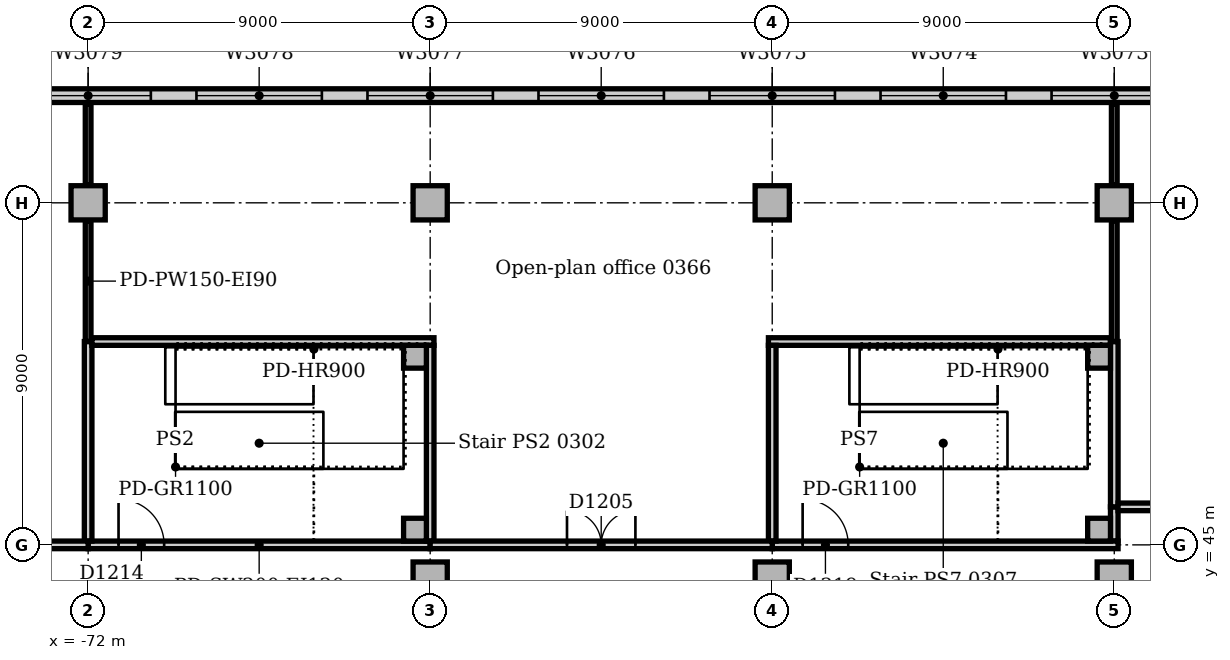
"""IFC4 building model, lengths in metres.
Left out: names, types, materials, properties, quantities, classifications, styles, units other than length and angle.
Written with IfcOpenShell. Run it as: python <this file> out.ifc"""

import sys

from ifc_helpers import new_model, si_unit, direction, frame, frame_2d, origin, origin_2d, place, context, subcontext, project, spatial, rectangle, extrude, element, fill, save


model = new_model("IFC4")
c1 = context("Model", 3, precision=1e-05, world=origin(), true_north=direction((0.0, 1.0)))
c2 = subcontext(c1, "Body", "Model", "MODEL_VIEW")
j1 = project(units=[si_unit("LENGTHUNIT", "METRE"), si_unit("PLANEANGLEUNIT", "RADIAN")], contexts=[c1])
p1 = place(None, origin())
s1 = spatial("IfcSite", under=j1, at=p1, CompositionType="ELEMENT")
p2 = place(p1, origin())
s2 = spatial("IfcBuilding", under=s1, at=p2, CompositionType="ELEMENT")
p3 = place(p2, frame((0.0, 0.0, 16.0)))
s3 = spatial("IfcBuildingStorey", under=s2, at=p3, CompositionType="ELEMENT", Elevation=16.0)
p4 = place(p3, frame((-68.398, 43.547, 0.0), z_axis=(0.0, 0.0, 1.0), x_axis=(1.0, 0.0, 0.0)))
e1 = element("IfcColumn", 1, at=p4, inside=s3, PredefinedType="COLUMN", context=c2, shape_type="SweptSolid", body=[
    extrude(rectangle(XDim=1.1, YDim=1.1, at=origin_2d()), origin(), (0.0, 0.0, 1.0), 4.7),
])
for number, where, z_axis, x_axis in (
    (2, (-63.0, 44.1, 0.0), (0.0, 0.0, 1.0), (1.0, 0.0, 0.0)),
    (3, (-54.0, 44.1, 0.0), (0.0, 0.0, 1.0), (1.0, 0.0, 0.0)),
    (4, (-45.0, 44.1, 0.0), (0.0, 0.0, 1.0), (1.0, 0.0, 0.0)),
    (5, (-72.0, 54.0, 0.0), (0.0, 0.0, 1.0), (1.0, 0.0, 0.0)),
    (6, (-63.0, 54.0, 0.0), (0.0, 0.0, 1.0), (1.0, 0.0, 0.0)),
    (7, (-54.0, 54.0, 0.0), (0.0, 0.0, 1.0), (1.0, 0.0, 0.0)),
    (8, (-45.0, 54.0, 0.0), (0.0, 0.0, 1.0), (1.0, 0.0, 0.0)),
):
    element("IfcColumn", number, at=place(p3, frame(where, z_axis=z_axis, x_axis=x_axis)), inside=s3, PredefinedType="COLUMN", context=c2, shape_type="SweptSolid", body=[
        extrude(rectangle(XDim=0.9, YDim=0.9, at=origin_2d()), origin(), (0.0, 0.0, 1.0), 4.7),
    ])
p5 = place(p3, frame((63.0, 56.82, 0.0), z_axis=(0.0, 0.0, 1.0), x_axis=(-1.0, 0.0, 0.0)))
e9 = element("IfcWall", 9, at=p5, inside=s3, PredefinedType="STANDARD", context=c2, shape_type="SweptSolid", body=[
    extrude(rectangle(XDim=144.0, YDim=0.36, at=frame_2d((72.0, 0.0))), origin(), (0.0, 0.0, 1.0), 4.7),
])
p6 = place(p5, frame((2.85, 0.0, 0.9)))
e10 = element("IfcOpeningElement", 10, at=p6, cuts=e9, PredefinedType="OPENING", context=c2, shape_type="SweptSolid", body=[
    extrude(rectangle(XDim=3.3, YDim=2.4, at=frame_2d((1.65, 1.2))), frame((0.0, 0.19, 0.0), z_axis=(0.0, -1.0, 0.0), x_axis=(1.0, 0.0, 0.0)), (0.0, 0.0, 1.0), 0.38),
])
p7 = place(p5, frame((7.35, 0.0, 0.9)))
e11 = element("IfcOpeningElement", 11, at=p7, cuts=e9, PredefinedType="OPENING", context=c2, shape_type="SweptSolid", body=[
    extrude(rectangle(XDim=3.3, YDim=2.4, at=frame_2d((1.65, 1.2))), frame((0.0, 0.19, 0.0), z_axis=(0.0, -1.0, 0.0), x_axis=(1.0, 0.0, 0.0)), (0.0, 0.0, 1.0), 0.38),
])
p8 = place(p5, frame((11.85, 0.0, 0.9)))
e12 = element("IfcOpeningElement", 12, at=p8, cuts=e9, PredefinedType="OPENING", context=c2, shape_type="SweptSolid", body=[
    extrude(rectangle(XDim=3.3, YDim=2.4, at=frame_2d((1.65, 1.2))), frame((0.0, 0.19, 0.0), z_axis=(0.0, -1.0, 0.0), x_axis=(1.0, 0.0, 0.0)), (0.0, 0.0, 1.0), 0.38),
])
p9 = place(p5, frame((16.35, 0.0, 0.9)))
e13 = element("IfcOpeningElement", 13, at=p9, cuts=e9, PredefinedType="OPENING", context=c2, shape_type="SweptSolid", body=[
    extrude(rectangle(XDim=3.3, YDim=2.4, at=frame_2d((1.65, 1.2))), frame((0.0, 0.19, 0.0), z_axis=(0.0, -1.0, 0.0), x_axis=(1.0, 0.0, 0.0)), (0.0, 0.0, 1.0), 0.38),
])
p10 = place(p5, frame((20.85, 0.0, 0.9)))
e14 = element("IfcOpeningElement", 14, at=p10, cuts=e9, PredefinedType="OPENING", context=c2, shape_type="SweptSolid", body=[
    extrude(rectangle(XDim=3.3, YDim=2.4, at=frame_2d((1.65, 1.2))), frame((0.0, 0.19, 0.0), z_axis=(0.0, -1.0, 0.0), x_axis=(1.0, 0.0, 0.0)), (0.0, 0.0, 1.0), 0.38),
])
p11 = place(p5, frame((25.35, 0.0, 0.9)))
e15 = element("IfcOpeningElement", 15, at=p11, cuts=e9, PredefinedType="OPENING", context=c2, shape_type="SweptSolid", body=[
    extrude(rectangle(XDim=3.3, YDim=2.4, at=frame_2d((1.65, 1.2))), frame((0.0, 0.19, 0.0), z_axis=(0.0, -1.0, 0.0), x_axis=(1.0, 0.0, 0.0)), (0.0, 0.0, 1.0), 0.38),
])
p12 = place(p5, frame((29.85, 0.0, 0.9)))
e16 = element("IfcOpeningElement", 16, at=p12, cuts=e9, PredefinedType="OPENING", context=c2, shape_type="SweptSolid", body=[
    extrude(rectangle(XDim=3.3, YDim=2.4, at=frame_2d((1.65, 1.2))), frame((0.0, 0.19, 0.0), z_axis=(0.0, -1.0, 0.0), x_axis=(1.0, 0.0, 0.0)), (0.0, 0.0, 1.0), 0.38),
])
p13 = place(p5, frame((34.35, 0.0, 0.9)))
e17 = element("IfcOpeningElement", 17, at=p13, cuts=e9, PredefinedType="OPENING", context=c2, shape_type="SweptSolid", body=[
    extrude(rectangle(XDim=3.3, YDim=2.4, at=frame_2d((1.65, 1.2))), frame((0.0, 0.19, 0.0), z_axis=(0.0, -1.0, 0.0), x_axis=(1.0, 0.0, 0.0)), (0.0, 0.0, 1.0), 0.38),
])
p14 = place(p5, frame((38.85, 0.0, 0.9)))
e18 = element("IfcOpeningElement", 18, at=p14, cuts=e9, PredefinedType="OPENING", context=c2, shape_type="SweptSolid", body=[
    extrude(rectangle(XDim=3.3, YDim=2.4, at=frame_2d((1.65, 1.2))), frame((0.0, 0.19, 0.0), z_axis=(0.0, -1.0, 0.0), x_axis=(1.0, 0.0, 0.0)), (0.0, 0.0, 1.0), 0.38),
])
p15 = place(p5, frame((43.35, 0.0, 0.9)))
e19 = element("IfcOpeningElement", 19, at=p15, cuts=e9, PredefinedType="OPENING", context=c2, shape_type="SweptSolid", body=[
    extrude(rectangle(XDim=3.3, YDim=2.4, at=frame_2d((1.65, 1.2))), frame((0.0, 0.19, 0.0), z_axis=(0.0, -1.0, 0.0), x_axis=(1.0, 0.0, 0.0)), (0.0, 0.0, 1.0), 0.38),
])
p16 = place(p5, frame((47.85, 0.0, 0.9)))
e20 = element("IfcOpeningElement", 20, at=p16, cuts=e9, PredefinedType="OPENING", context=c2, shape_type="SweptSolid", body=[
    extrude(rectangle(XDim=3.3, YDim=2.4, at=frame_2d((1.65, 1.2))), frame((0.0, 0.19, 0.0), z_axis=(0.0, -1.0, 0.0), x_axis=(1.0, 0.0, 0.0)), (0.0, 0.0, 1.0), 0.38),
])
p17 = place(p5, frame((52.35, 0.0, 0.9)))
e21 = element("IfcOpeningElement", 21, at=p17, cuts=e9, PredefinedType="OPENING", context=c2, shape_type="SweptSolid", body=[
    extrude(rectangle(XDim=3.3, YDim=2.4, at=frame_2d((1.65, 1.2))), frame((0.0, 0.19, 0.0), z_axis=(0.0, -1.0, 0.0), x_axis=(1.0, 0.0, 0.0)), (0.0, 0.0, 1.0), 0.38),
])
p18 = place(p5, frame((56.85, 0.0, 0.9)))
e22 = element("IfcOpeningElement", 22, at=p18, cuts=e9, PredefinedType="OPENING", context=c2, shape_type="SweptSolid", body=[
    extrude(rectangle(XDim=3.3, YDim=2.4, at=frame_2d((1.65, 1.2))), frame((0.0, 0.19, 0.0), z_axis=(0.0, -1.0, 0.0), x_axis=(1.0, 0.0, 0.0)), (0.0, 0.0, 1.0), 0.38),
])
p19 = place(p5, frame((92.85, 0.0, 0.9)))
e23 = element("IfcOpeningElement", 23, at=p19, cuts=e9, PredefinedType="OPENING", context=c2, shape_type="SweptSolid", body=[
    extrude(rectangle(XDim=3.3, YDim=2.4, at=frame_2d((1.65, 1.2))), frame((0.0, 0.19, 0.0), z_axis=(0.0, -1.0, 0.0), x_axis=(1.0, 0.0, 0.0)), (0.0, 0.0, 1.0), 0.38),
])
p20 = place(p5, frame((97.35, 0.0, 0.9)))
e24 = element("IfcOpeningElement", 24, at=p20, cuts=e9, PredefinedType="OPENING", context=c2, shape_type="SweptSolid", body=[
    extrude(rectangle(XDim=3.3, YDim=2.4, at=frame_2d((1.65, 1.2))), frame((0.0, 0.19, 0.0), z_axis=(0.0, -1.0, 0.0), x_axis=(1.0, 0.0, 0.0)), (0.0, 0.0, 1.0), 0.38),
])
p21 = place(p5, frame((101.85, 0.0, 0.9)))
e25 = element("IfcOpeningElement", 25, at=p21, cuts=e9, PredefinedType="OPENING", context=c2, shape_type="SweptSolid", body=[
    extrude(rectangle(XDim=3.3, YDim=2.4, at=frame_2d((1.65, 1.2))), frame((0.0, 0.19, 0.0), z_axis=(0.0, -1.0, 0.0), x_axis=(1.0, 0.0, 0.0)), (0.0, 0.0, 1.0), 0.38),
])
p22 = place(p5, frame((106.35, 0.0, 0.9)))
e26 = element("IfcOpeningElement", 26, at=p22, cuts=e9, PredefinedType="OPENING", context=c2, shape_type="SweptSolid", body=[
    extrude(rectangle(XDim=3.3, YDim=2.4, at=frame_2d((1.65, 1.2))), frame((0.0, 0.19, 0.0), z_axis=(0.0, -1.0, 0.0), x_axis=(1.0, 0.0, 0.0)), (0.0, 0.0, 1.0), 0.38),
])
p23 = place(p5, frame((110.85, 0.0, 0.9)))
e27 = element("IfcOpeningElement", 27, at=p23, cuts=e9, PredefinedType="OPENING", context=c2, shape_type="SweptSolid", body=[
    extrude(rectangle(XDim=3.3, YDim=2.4, at=frame_2d((1.65, 1.2))), frame((0.0, 0.19, 0.0), z_axis=(0.0, -1.0, 0.0), x_axis=(1.0, 0.0, 0.0)), (0.0, 0.0, 1.0), 0.38),
])
p24 = place(p5, frame((115.35, 0.0, 0.9)))
e28 = element("IfcOpeningElement", 28, at=p24, cuts=e9, PredefinedType="OPENING", context=c2, shape_type="SweptSolid", body=[
    extrude(rectangle(XDim=3.3, YDim=2.4, at=frame_2d((1.65, 1.2))), frame((0.0, 0.19, 0.0), z_axis=(0.0, -1.0, 0.0), x_axis=(1.0, 0.0, 0.0)), (0.0, 0.0, 1.0), 0.38),
])
p25 = place(p5, frame((119.85, 0.0, 0.9)))
e29 = element("IfcOpeningElement", 29, at=p25, cuts=e9, PredefinedType="OPENING", context=c2, shape_type="SweptSolid", body=[
    extrude(rectangle(XDim=3.3, YDim=2.4, at=frame_2d((1.65, 1.2))), frame((0.0, 0.19, 0.0), z_axis=(0.0, -1.0, 0.0), x_axis=(1.0, 0.0, 0.0)), (0.0, 0.0, 1.0), 0.38),
])
p26 = place(p5, frame((124.35, 0.0, 0.9)))
e30 = element("IfcOpeningElement", 30, at=p26, cuts=e9, PredefinedType="OPENING", context=c2, shape_type="SweptSolid", body=[
    extrude(rectangle(XDim=3.3, YDim=2.4, at=frame_2d((1.65, 1.2))), frame((0.0, 0.19, 0.0), z_axis=(0.0, -1.0, 0.0), x_axis=(1.0, 0.0, 0.0)), (0.0, 0.0, 1.0), 0.38),
])
p27 = place(p5, frame((128.85, 0.0, 0.9)))
e31 = element("IfcOpeningElement", 31, at=p27, cuts=e9, PredefinedType="OPENING", context=c2, shape_type="SweptSolid", body=[
    extrude(rectangle(XDim=3.3, YDim=2.4, at=frame_2d((1.65, 1.2))), frame((0.0, 0.19, 0.0), z_axis=(0.0, -1.0, 0.0), x_axis=(1.0, 0.0, 0.0)), (0.0, 0.0, 1.0), 0.38),
])
p28 = place(p5, frame((133.35, 0.0, 0.9)))
e32 = element("IfcOpeningElement", 32, at=p28, cuts=e9, PredefinedType="OPENING", context=c2, shape_type="SweptSolid", body=[
    extrude(rectangle(XDim=3.3, YDim=2.4, at=frame_2d((1.65, 1.2))), frame((0.0, 0.19, 0.0), z_axis=(0.0, -1.0, 0.0), x_axis=(1.0, 0.0, 0.0)), (0.0, 0.0, 1.0), 0.38),
])
p29 = place(p5, frame((137.85, 0.0, 0.9)))
e33 = element("IfcOpeningElement", 33, at=p29, cuts=e9, PredefinedType="OPENING", context=c2, shape_type="SweptSolid", body=[
    extrude(rectangle(XDim=3.3, YDim=2.4, at=frame_2d((1.65, 1.2))), frame((0.0, 0.19, 0.0), z_axis=(0.0, -1.0, 0.0), x_axis=(1.0, 0.0, 0.0)), (0.0, 0.0, 1.0), 0.38),
])
for number, where, z_axis, x_axis in (
    (34, (-63.4, 49.95, 0.0), (0.0, 0.0, 1.0), (1.0, 0.0, 0.0)),
    (35, (-63.4, 45.4, 0.0), (0.0, 0.0, 1.0), (1.0, 0.0, 0.0)),
    (36, (-45.4, 49.95, 0.0), (0.0, 0.0, 1.0), (1.0, 0.0, 0.0)),
    (37, (-45.4, 45.4, 0.0), (0.0, 0.0, 1.0), (1.0, 0.0, 0.0)),
):
    element("IfcColumn", number, at=place(p3, frame(where, z_axis=z_axis, x_axis=x_axis)), inside=s3, PredefinedType="COLUMN", context=c2, shape_type="SweptSolid", body=[
        extrude(rectangle(XDim=0.6, YDim=0.6, at=origin_2d()), origin(), (0.0, 0.0, 1.0), 5.0),
    ])
p30 = place(p3, frame((-72.0, 45.0, 0.0), z_axis=(0.0, 0.0, 1.0), x_axis=(1.0, 0.0, 0.0)))
e38 = element("IfcWall", 38, at=p30, inside=s3, PredefinedType="SOLIDWALL", context=c2, shape_type="SweptSolid", body=[
    extrude(rectangle(XDim=9.0, YDim=0.2, at=frame_2d((4.5, 0.0))), origin(), (0.0, 0.0, 1.0), 4.7),
])
p31 = place(p30, frame((0.8, 0.0, 0.0)))
e39 = element("IfcOpeningElement", 39, at=p31, cuts=e38, PredefinedType="OPENING", context=c2, shape_type="SweptSolid", body=[
    extrude(rectangle(XDim=1.2, YDim=2.1, at=frame_2d((0.6, 1.05))), frame((0.0, 0.11, 0.0), z_axis=(0.0, -1.0, 0.0), x_axis=(1.0, 0.0, 0.0)), (0.0, 0.0, 1.0), 0.22),
])
p32 = place(p3, frame((-72.0, 45.1, 0.0), z_axis=(0.0, 0.0, 1.0), x_axis=(0.0, 1.0, 0.0)))
e40 = element("IfcWall", 40, at=p32, inside=s3, PredefinedType="SOLIDWALL", context=c2, shape_type="SweptSolid", body=[
    extrude(rectangle(XDim=5.25, YDim=0.2, at=frame_2d((2.625, 0.0))), origin(), (0.0, 0.0, 1.0), 4.7),
])
p33 = place(p3, frame((-71.9, 50.35, 0.0), z_axis=(0.0, 0.0, 1.0), x_axis=(1.0, 0.0, 0.0)))
e41 = element("IfcWall", 41, at=p33, inside=s3, PredefinedType="SOLIDWALL", context=c2, shape_type="SweptSolid", body=[
    extrude(rectangle(XDim=9.0, YDim=0.2, at=frame_2d((4.5, 0.0))), origin(), (0.0, 0.0, 1.0), 4.7),
])
p34 = place(p3, frame((-63.0, 45.1, 0.0), z_axis=(0.0, 0.0, 1.0), x_axis=(0.0, 1.0, 0.0)))
e42 = element("IfcWall", 42, at=p34, inside=s3, PredefinedType="SOLIDWALL", context=c2, shape_type="SweptSolid", body=[
    extrude(rectangle(XDim=5.15, YDim=0.2, at=frame_2d((2.575, 0.0))), origin(), (0.0, 0.0, 1.0), 4.7),
])
p35 = place(p3, frame((-45.0, 45.1, 0.0), z_axis=(0.0, 0.0, 1.0), x_axis=(0.0, 1.0, 0.0)))
e43 = element("IfcWall", 43, at=p35, inside=s3, PredefinedType="SOLIDWALL", context=c2, shape_type="SweptSolid", body=[
    extrude(rectangle(XDim=0.9, YDim=0.2, at=frame_2d((0.45, 0.0))), origin(), (0.0, 0.0, 1.0), 4.7),
])
p36 = place(p3, frame((-54.0, 45.0, 0.0), z_axis=(0.0, 0.0, 1.0), x_axis=(1.0, 0.0, 0.0)))
e44 = element("IfcWall", 44, at=p36, inside=s3, PredefinedType="SOLIDWALL", context=c2, shape_type="SweptSolid", body=[
    extrude(rectangle(XDim=9.1, YDim=0.2, at=frame_2d((4.55, 0.0))), origin(), (0.0, 0.0, 1.0), 4.7),
])
p37 = place(p36, frame((0.8, 0.0, 0.0)))
e45 = element("IfcOpeningElement", 45, at=p37, cuts=e44, PredefinedType="OPENING", context=c2, shape_type="SweptSolid", body=[
    extrude(rectangle(XDim=1.2, YDim=2.1, at=frame_2d((0.6, 1.05))), frame((0.0, 0.11, 0.0), z_axis=(0.0, -1.0, 0.0), x_axis=(1.0, 0.0, 0.0)), (0.0, 0.0, 1.0), 0.22),
])
p38 = place(p3, frame((-54.1, 50.35, 0.0), z_axis=(0.0, 0.0, 1.0), x_axis=(1.0, 0.0, 0.0)))
e46 = element("IfcWall", 46, at=p38, inside=s3, PredefinedType="SOLIDWALL", context=c2, shape_type="SweptSolid", body=[
    extrude(rectangle(XDim=9.0, YDim=0.2, at=frame_2d((4.5, 0.0))), origin(), (0.0, 0.0, 1.0), 4.7),
])
p39 = place(p3, frame((-54.0, 45.1, 0.0), z_axis=(0.0, 0.0, 1.0), x_axis=(0.0, 1.0, 0.0)))
e47 = element("IfcWall", 47, at=p39, inside=s3, PredefinedType="SOLIDWALL", context=c2, shape_type="SweptSolid", body=[
    extrude(rectangle(XDim=5.15, YDim=0.2, at=frame_2d((2.575, 0.0))), origin(), (0.0, 0.0, 1.0), 4.7),
])
p40 = place(p3, frame((-45.0, 46.0, 0.0), z_axis=(0.0, 0.0, 1.0), x_axis=(0.0, 1.0, 0.0)))
e48 = element("IfcWall", 48, at=p40, inside=s3, PredefinedType="SOLIDWALL", context=c2, shape_type="SweptSolid", body=[
    extrude(rectangle(XDim=4.35, YDim=0.2, at=frame_2d((2.175, 0.0))), origin(), (0.0, 0.0, 1.0), 4.7),
])
p41 = place(p3, frame((-80.53, 45.0, 0.0), z_axis=(0.0, 0.0, 1.0), x_axis=(1.0, 0.0, 0.0)))
e49 = element("IfcWall", 49, at=p41, inside=s3, PredefinedType="PARTITIONING", context=c2, shape_type="SweptSolid", body=[
    extrude(rectangle(XDim=8.53, YDim=0.2, at=frame_2d((4.265, 0.0))), origin(), (0.0, 0.0, 1.0), 4.7),
])
p42 = place(p41, frame((2.03, 0.0, 0.0)))
e50 = element("IfcOpeningElement", 50, at=p42, cuts=e49, PredefinedType="OPENING", context=c2, shape_type="SweptSolid", body=[
    extrude(rectangle(XDim=1.0, YDim=2.1, at=frame_2d((0.5, 1.05))), frame((0.0, 0.11, 0.0), z_axis=(0.0, -1.0, 0.0), x_axis=(1.0, 0.0, 0.0)), (0.0, 0.0, 1.0), 0.22),
])
p43 = place(p3, frame((-63.0, 45.0, 0.0), z_axis=(0.0, 0.0, 1.0), x_axis=(1.0, 0.0, 0.0)))
e51 = element("IfcWall", 51, at=p43, inside=s3, PredefinedType="PARTITIONING", context=c2, shape_type="SweptSolid", body=[
    extrude(rectangle(XDim=9.0, YDim=0.2, at=frame_2d((4.5, 0.0))), origin(), (0.0, 0.0, 1.0), 4.7),
])
p44 = place(p43, frame((3.6, 0.0, 0.0)))
e52 = element("IfcOpeningElement", 52, at=p44, cuts=e51, PredefinedType="OPENING", context=c2, shape_type="SweptSolid", body=[
    extrude(rectangle(XDim=1.8, YDim=2.1, at=frame_2d((0.9, 1.05))), frame((0.0, 0.11, 0.0), z_axis=(0.0, -1.0, 0.0), x_axis=(1.0, 0.0, 0.0)), (0.0, 0.0, 1.0), 0.22),
])
p45 = place(p3, frame((-44.9, 46.0, 0.0), z_axis=(0.0, 0.0, 1.0), x_axis=(1.0, 0.0, 0.0)))
e53 = element("IfcWall", 53, at=p45, inside=s3, PredefinedType="PARTITIONING", context=c2, shape_type="SweptSolid", body=[
    extrude(rectangle(XDim=2.9, YDim=0.2, at=frame_2d((1.45, 0.0))), origin(), (0.0, 0.0, 1.0), 4.7),
])
p46 = place(p3, frame((-72.0, 50.35, 0.0), z_axis=(0.0, 0.0, 1.0), x_axis=(0.0, 1.0, 0.0)))
e54 = element("IfcWall", 54, at=p46, inside=s3, PredefinedType="PARTITIONING", context=c2, shape_type="SweptSolid", body=[
    extrude(rectangle(XDim=3.18, YDim=0.15, at=frame_2d((1.59, 0.0))), origin(), (0.0, 0.0, 1.0), 4.7),
])
p47 = place(p3, frame((-72.0, 54.47, 0.0), z_axis=(0.0, 0.0, 1.0), x_axis=(0.0, 1.0, 0.0)))
e55 = element("IfcWall", 55, at=p47, inside=s3, PredefinedType="PARTITIONING", context=c2, shape_type="SweptSolid", body=[
    extrude(rectangle(XDim=2.13, YDim=0.15, at=frame_2d((1.065, 0.0))), origin(), (0.0, 0.0, 1.0), 4.7),
])
p48 = place(p3, frame((-45.0, 50.35, 0.0), z_axis=(0.0, 0.0, 1.0), x_axis=(0.0, 1.0, 0.0)))
e56 = element("IfcWall", 56, at=p48, inside=s3, PredefinedType="PARTITIONING", context=c2, shape_type="SweptSolid", body=[
    extrude(rectangle(XDim=3.18, YDim=0.15, at=frame_2d((1.59, 0.0))), origin(), (0.0, 0.0, 1.0), 4.7),
])
p49 = place(p3, frame((-45.0, 54.47, 0.0), z_axis=(0.0, 0.0, 1.0), x_axis=(0.0, 1.0, 0.0)))
e57 = element("IfcWall", 57, at=p49, inside=s3, PredefinedType="PARTITIONING", context=c2, shape_type="SweptSolid", body=[
    extrude(rectangle(XDim=2.13, YDim=0.15, at=frame_2d((1.065, 0.0))), origin(), (0.0, 0.0, 1.0), 4.7),
])
p50 = place(p22, origin())
e58 = element("IfcWindow", 58, at=p50, inside=s3, PartitioningType="SINGLE_PANEL", PredefinedType="WINDOW", context=c2, shape_type="SweptSolid", body=[
    extrude(rectangle(XDim=3.3, YDim=2.4, at=frame_2d((1.65, 1.2))), frame((0.0, 0.13, 0.0), z_axis=(0.0, -1.0, 0.0), x_axis=(1.0, 0.0, 0.0)), (0.0, 0.0, 1.0), 0.06),
])
fill(e26, e58)
p51 = place(p23, origin())
e59 = element("IfcWindow", 59, at=p51, inside=s3, PartitioningType="SINGLE_PANEL", PredefinedType="WINDOW", context=c2, shape_type="SweptSolid", body=[
    extrude(rectangle(XDim=3.3, YDim=2.4, at=frame_2d((1.65, 1.2))), frame((0.0, 0.13, 0.0), z_axis=(0.0, -1.0, 0.0), x_axis=(1.0, 0.0, 0.0)), (0.0, 0.0, 1.0), 0.06),
])
fill(e27, e59)
p52 = place(p24, origin())
e60 = element("IfcWindow", 60, at=p52, inside=s3, PartitioningType="SINGLE_PANEL", PredefinedType="WINDOW", context=c2, shape_type="SweptSolid", body=[
    extrude(rectangle(XDim=3.3, YDim=2.4, at=frame_2d((1.65, 1.2))), frame((0.0, 0.13, 0.0), z_axis=(0.0, -1.0, 0.0), x_axis=(1.0, 0.0, 0.0)), (0.0, 0.0, 1.0), 0.06),
])
fill(e28, e60)
p53 = place(p25, origin())
e61 = element("IfcWindow", 61, at=p53, inside=s3, PartitioningType="SINGLE_PANEL", PredefinedType="WINDOW", context=c2, shape_type="SweptSolid", body=[
    extrude(rectangle(XDim=3.3, YDim=2.4, at=frame_2d((1.65, 1.2))), frame((0.0, 0.13, 0.0), z_axis=(0.0, -1.0, 0.0), x_axis=(1.0, 0.0, 0.0)), (0.0, 0.0, 1.0), 0.06),
])
fill(e29, e61)
p54 = place(p26, origin())
e62 = element("IfcWindow", 62, at=p54, inside=s3, PartitioningType="SINGLE_PANEL", PredefinedType="WINDOW", context=c2, shape_type="SweptSolid", body=[
    extrude(rectangle(XDim=3.3, YDim=2.4, at=frame_2d((1.65, 1.2))), frame((0.0, 0.13, 0.0), z_axis=(0.0, -1.0, 0.0), x_axis=(1.0, 0.0, 0.0)), (0.0, 0.0, 1.0), 0.06),
])
fill(e30, e62)
p55 = place(p27, origin())
e63 = element("IfcWindow", 63, at=p55, inside=s3, PartitioningType="SINGLE_PANEL", PredefinedType="WINDOW", context=c2, shape_type="SweptSolid", body=[
    extrude(rectangle(XDim=3.3, YDim=2.4, at=frame_2d((1.65, 1.2))), frame((0.0, 0.13, 0.0), z_axis=(0.0, -1.0, 0.0), x_axis=(1.0, 0.0, 0.0)), (0.0, 0.0, 1.0), 0.06),
])
fill(e31, e63)
p56 = place(p28, origin())
e64 = element("IfcWindow", 64, at=p56, inside=s3, PartitioningType="SINGLE_PANEL", PredefinedType="WINDOW", context=c2, shape_type="SweptSolid", body=[
    extrude(rectangle(XDim=3.3, YDim=2.4, at=frame_2d((1.65, 1.2))), frame((0.0, 0.13, 0.0), z_axis=(0.0, -1.0, 0.0), x_axis=(1.0, 0.0, 0.0)), (0.0, 0.0, 1.0), 0.06),
])
fill(e32, e64)
p57 = place(p44, origin())
e65 = element("IfcDoor", 65, at=p57, inside=s3, OperationType="DOUBLE_DOOR_SINGLE_SWING", PredefinedType="DOOR", context=c2, shape_type="SweptSolid", body=[
    extrude(rectangle(XDim=1.8, YDim=2.1, at=frame_2d((0.9, 1.05))), frame((0.0, 0.025, 0.0), z_axis=(0.0, -1.0, 0.0), x_axis=(1.0, 0.0, 0.0)), (0.0, 0.0, 1.0), 0.05),
])
fill(e52, e65)
p58 = place(p31, origin())
e66 = element("IfcDoor", 66, at=p58, inside=s3, OperationType="SINGLE_SWING_LEFT", PredefinedType="DOOR", context=c2, shape_type="SweptSolid", body=[
    extrude(rectangle(XDim=1.2, YDim=2.1, at=frame_2d((0.6, 1.05))), frame((0.0, 0.025, 0.0), z_axis=(0.0, -1.0, 0.0), x_axis=(1.0, 0.0, 0.0)), (0.0, 0.0, 1.0), 0.05),
])
fill(e39, e66)
p59 = place(p37, origin())
e67 = element("IfcDoor", 67, at=p59, inside=s3, OperationType="SINGLE_SWING_LEFT", PredefinedType="DOOR", context=c2, shape_type="SweptSolid", body=[
    extrude(rectangle(XDim=1.2, YDim=2.1, at=frame_2d((0.6, 1.05))), frame((0.0, 0.025, 0.0), z_axis=(0.0, -1.0, 0.0), x_axis=(1.0, 0.0, 0.0)), (0.0, 0.0, 1.0), 0.05),
])
fill(e45, e67)
save(model, sys.argv[1])
